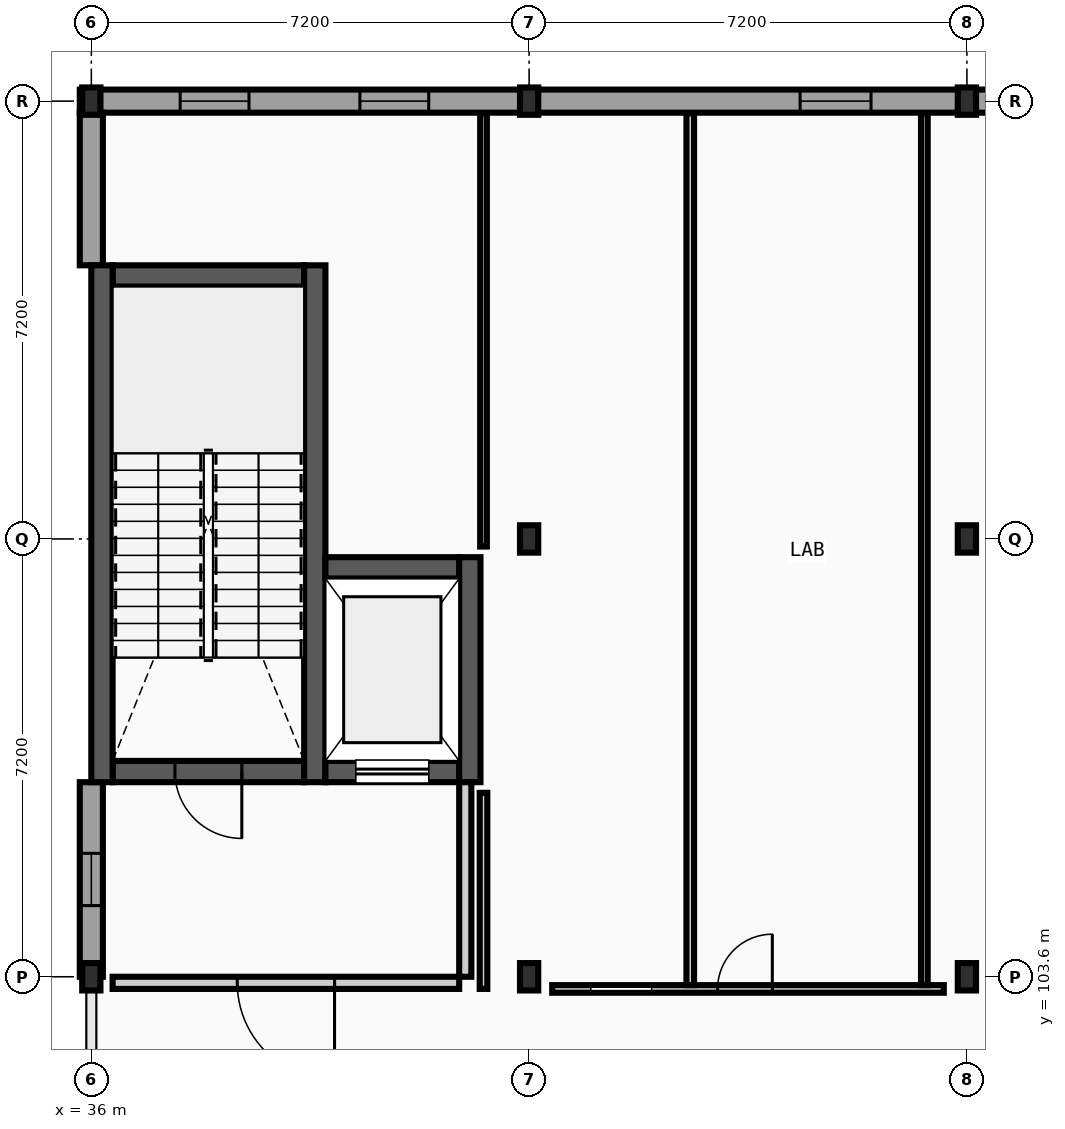
"""IFC4 building model, lengths in metres.
Left out: names, types, materials, properties, quantities, classifications, styles, units other than length and angle.
Written with IfcOpenShell. Run it as: python <this file> out.ifc"""

import sys

from ifc_helpers import new_model, si_unit, direction, frame, frame_2d, origin, origin_2d, place, context, subcontext, project, spatial, rectangle, i_section, extrude, element, fill, save


model = new_model("IFC4")
c1 = context("Model", 3, precision=1e-05, world=origin(), true_north=direction((0.0, 1.0)))
c2 = subcontext(c1, "Body", "Model", "MODEL_VIEW")
j1 = project(units=[si_unit("LENGTHUNIT", "METRE"), si_unit("PLANEANGLEUNIT", "RADIAN")], contexts=[c1])
p1 = place(None, origin())
s1 = spatial("IfcSite", under=j1, at=p1, CompositionType="ELEMENT")
p2 = place(p1, origin())
s2 = spatial("IfcBuilding", under=s1, at=p2, CompositionType="ELEMENT")
p3 = place(p2, frame((0.0, 0.0, 5.2)))
s3 = spatial("IfcBuildingStorey", under=s2, at=p3, CompositionType="ELEMENT", Elevation=5.2)
for number, where, z_axis, x_axis in (
    (1, (36.0, 103.6, 0.0), (0.0, 0.0, 1.0), (1.0, 0.0, 0.0)),
    (2, (36.0, 118.0, 0.0), (0.0, 0.0, 1.0), (1.0, 0.0, 0.0)),
    (3, (43.2, 103.6, 0.0), (0.0, 0.0, 1.0), (1.0, 0.0, 0.0)),
    (4, (43.2, 110.8, 0.0), (0.0, 0.0, 1.0), (1.0, 0.0, 0.0)),
    (5, (43.2, 118.0, 0.0), (0.0, 0.0, 1.0), (1.0, 0.0, 0.0)),
    (6, (50.4, 103.6, 0.0), (0.0, 0.0, 1.0), (1.0, 0.0, 0.0)),
    (7, (50.4, 110.8, 0.0), (0.0, 0.0, 1.0), (1.0, 0.0, 0.0)),
    (8, (50.4, 118.0, 0.0), (0.0, 0.0, 1.0), (1.0, 0.0, 0.0)),
):
    element("IfcColumn", number, at=place(p3, frame(where, z_axis=z_axis, x_axis=x_axis)), inside=s3, PredefinedType="COLUMN", context=c2, shape_type="SweptSolid", body=[
        extrude(i_section(OverallWidth=0.3, OverallDepth=0.45, WebThickness=0.014, FlangeThickness=0.026, FilletRadius=0.027, at=origin_2d()), origin(), (0.0, 0.0, 1.0), 4.4),
    ])
p4 = place(p3, frame((43.2, 118.0, 0.0), z_axis=(0.0, 0.0, 1.0), x_axis=(-1.0, 0.0, 0.0)))
e9 = element("IfcWall", 9, at=p4, inside=s3, PredefinedType="STANDARD", context=c2, shape_type="SweptSolid", body=[
    extrude(rectangle(XDim=7.39, YDim=0.38, at=frame_2d((3.695, 0.0))), origin(), (0.0, 0.0, 1.0), 3.88),
])
p5 = place(p4, frame((1.651, 0.0, 0.95)))
e10 = element("IfcOpeningElement", 10, at=p5, cuts=e9, PredefinedType="OPENING", context=c2, shape_type="SweptSolid", body=[
    extrude(rectangle(XDim=1.132, YDim=1.368, at=frame_2d((0.566, 0.684))), frame((0.0, 0.2, 0.0), z_axis=(0.0, -1.0, 0.0), x_axis=(1.0, 0.0, 0.0)), (0.0, 0.0, 1.0), 0.4),
])
p6 = place(p4, frame((4.607, 0.0, 0.95)))
e11 = element("IfcOpeningElement", 11, at=p6, cuts=e9, PredefinedType="OPENING", context=c2, shape_type="SweptSolid", body=[
    extrude(rectangle(XDim=1.132, YDim=1.368, at=frame_2d((0.566, 0.684))), frame((0.0, 0.2, 0.0), z_axis=(0.0, -1.0, 0.0), x_axis=(1.0, 0.0, 0.0)), (0.0, 0.0, 1.0), 0.4),
])
p7 = place(p3, frame((50.4, 118.0, 0.0), z_axis=(0.0, 0.0, 1.0), x_axis=(-1.0, 0.0, 0.0)))
e12 = element("IfcWall", 12, at=p7, inside=s3, PredefinedType="STANDARD", context=c2, shape_type="SweptSolid", body=[
    extrude(rectangle(XDim=7.2, YDim=0.38, at=frame_2d((3.6, 0.0))), origin(), (0.0, 0.0, 1.0), 3.88),
])
p8 = place(p7, frame((1.577, 0.0, 0.95)))
e13 = element("IfcOpeningElement", 13, at=p8, cuts=e12, PredefinedType="OPENING", context=c2, shape_type="SweptSolid", body=[
    extrude(rectangle(XDim=1.166, YDim=1.368, at=frame_2d((0.583, 0.684))), frame((0.0, 0.2, 0.0), z_axis=(0.0, -1.0, 0.0), x_axis=(1.0, 0.0, 0.0)), (0.0, 0.0, 1.0), 0.4),
])
p9 = place(p3, frame((57.6, 118.0, 0.0), z_axis=(0.0, 0.0, 1.0), x_axis=(-1.0, 0.0, 0.0)))
e14 = element("IfcWall", 14, at=p9, inside=s3, PredefinedType="STANDARD", context=c2, shape_type="SweptSolid", body=[
    extrude(rectangle(XDim=7.2, YDim=0.38, at=frame_2d((3.6, 0.0))), origin(), (0.0, 0.0, 1.0), 3.88),
])
p10 = place(p9, frame((1.56, 0.0, 0.95)))
e15 = element("IfcOpeningElement", 15, at=p10, cuts=e14, PredefinedType="OPENING", context=c2, shape_type="SweptSolid", body=[
    extrude(rectangle(XDim=1.2, YDim=1.368, at=frame_2d((0.6, 0.684))), frame((0.0, 0.2, 0.0), z_axis=(0.0, -1.0, 0.0), x_axis=(1.0, 0.0, 0.0)), (0.0, 0.0, 1.0), 0.4),
])
p11 = place(p9, frame((4.44, 0.0, 0.95)))
e16 = element("IfcOpeningElement", 16, at=p11, cuts=e14, PredefinedType="OPENING", context=c2, shape_type="SweptSolid", body=[
    extrude(rectangle(XDim=1.2, YDim=1.368, at=frame_2d((0.6, 0.684))), frame((0.0, 0.2, 0.0), z_axis=(0.0, -1.0, 0.0), x_axis=(1.0, 0.0, 0.0)), (0.0, 0.0, 1.0), 0.4),
])
p12 = place(p3, frame((36.0, 106.8, 0.0), z_axis=(0.0, 0.0, 1.0), x_axis=(0.0, -1.0, 0.0)))
e17 = element("IfcWall", 17, at=p12, inside=s3, PredefinedType="STANDARD", context=c2, shape_type="SweptSolid", body=[
    extrude(rectangle(XDim=3.2, YDim=0.38, at=frame_2d((1.6, 0.0))), origin(), (0.0, 0.0, 1.0), 4.185),
])
p13 = place(p12, frame((1.17, 0.0, 0.95)))
e18 = element("IfcOpeningElement", 18, at=p13, cuts=e17, PredefinedType="OPENING", context=c2, shape_type="SweptSolid", body=[
    extrude(rectangle(XDim=0.86, YDim=1.404, at=frame_2d((0.43, 0.702))), frame((0.0, 0.2, 0.0), z_axis=(0.0, -1.0, 0.0), x_axis=(1.0, 0.0, 0.0)), (0.0, 0.0, 1.0), 0.4),
])
p14 = place(p3, frame((36.0, 117.81, 0.0), z_axis=(0.0, 0.0, 1.0), x_axis=(0.0, -1.0, 0.0)))
e19 = element("IfcWall", 19, at=p14, inside=s3, PredefinedType="STANDARD", context=c2, shape_type="SweptSolid", body=[
    extrude(rectangle(XDim=2.51, YDim=0.38, at=frame_2d((1.255, 0.0))), origin(), (0.0, 0.0, 1.0), 4.185),
])
p15 = place(p3, frame((36.35, 106.975, 0.0), z_axis=(0.0, 0.0, 1.0), x_axis=(1.0, 0.0, 0.0)))
e20 = element("IfcWall", 20, at=p15, inside=s3, PredefinedType="SHEAR", context=c2, shape_type="SweptSolid", body=[
    extrude(rectangle(XDim=3.15, YDim=0.35, at=frame_2d((1.575, 0.0))), origin(), (0.0, 0.0, 1.0), 4.185),
])
p16 = place(p15, frame((1.025, 0.0, 0.0)))
e21 = element("IfcOpeningElement", 21, at=p16, cuts=e20, PredefinedType="OPENING", context=c2, shape_type="SweptSolid", body=[
    extrude(rectangle(XDim=1.1, YDim=2.15, at=frame_2d((0.55, 1.075))), frame((0.0, 0.185, 0.0), z_axis=(0.0, -1.0, 0.0), x_axis=(1.0, 0.0, 0.0)), (0.0, 0.0, 1.0), 0.37),
])
p17 = place(p3, frame((36.35, 115.125, 0.0), z_axis=(0.0, 0.0, 1.0), x_axis=(1.0, 0.0, 0.0)))
e22 = element("IfcWall", 22, at=p17, inside=s3, PredefinedType="SHEAR", context=c2, shape_type="SweptSolid", body=[
    extrude(rectangle(XDim=3.15, YDim=0.35, at=frame_2d((1.575, 0.0))), origin(), (0.0, 0.0, 1.0), 4.185),
])
for number, where, z_axis, x_axis in (
    (23, (36.175, 106.8, 0.0), (0.0, 0.0, 1.0), (0.0, 1.0, 0.0)),
    (24, (39.675, 106.8, 0.0), (0.0, 0.0, 1.0), (0.0, 1.0, 0.0)),
):
    element("IfcWall", number, at=place(p3, frame(where, z_axis=z_axis, x_axis=x_axis)), inside=s3, PredefinedType="SHEAR", context=c2, shape_type="SweptSolid", body=[
        extrude(rectangle(XDim=8.5, YDim=0.35, at=frame_2d((4.25, 0.0))), origin(), (0.0, 0.0, 1.0), 4.185),
    ])
p18 = place(p3, frame((39.85, 106.975, 0.0), z_axis=(0.0, 0.0, 1.0), x_axis=(1.0, 0.0, 0.0)))
e25 = element("IfcWall", 25, at=p18, inside=s3, PredefinedType="SHEAR", context=c2, shape_type="SweptSolid", body=[
    extrude(rectangle(XDim=2.2, YDim=0.35, at=frame_2d((1.1, 0.0))), origin(), (0.0, 0.0, 1.0), 4.185),
])
p19 = place(p18, frame((0.5, 0.0, 0.0)))
e26 = element("IfcOpeningElement", 26, at=p19, cuts=e25, PredefinedType="OPENING", context=c2, shape_type="SweptSolid", body=[
    extrude(rectangle(XDim=1.2, YDim=2.2, at=frame_2d((0.6, 1.1))), frame((0.0, 0.185, 0.0), z_axis=(0.0, -1.0, 0.0), x_axis=(1.0, 0.0, 0.0)), (0.0, 0.0, 1.0), 0.37),
])
p20 = place(p3, frame((39.85, 110.325, 0.0), z_axis=(0.0, 0.0, 1.0), x_axis=(1.0, 0.0, 0.0)))
e27 = element("IfcWall", 27, at=p20, inside=s3, PredefinedType="SHEAR", context=c2, shape_type="SweptSolid", body=[
    extrude(rectangle(XDim=2.2, YDim=0.35, at=frame_2d((1.1, 0.0))), origin(), (0.0, 0.0, 1.0), 4.185),
])
p21 = place(p3, frame((42.225, 106.8, 0.0), z_axis=(0.0, 0.0, 1.0), x_axis=(0.0, 1.0, 0.0)))
e28 = element("IfcWall", 28, at=p21, inside=s3, PredefinedType="SHEAR", context=c2, shape_type="SweptSolid", body=[
    extrude(rectangle(XDim=3.7, YDim=0.35, at=frame_2d((1.85, 0.0))), origin(), (0.0, 0.0, 1.0), 4.185),
])
p22 = place(p3, frame((36.35, 103.5, 0.0), z_axis=(0.0, 0.0, 1.0), x_axis=(1.0, 0.0, 0.0)))
e29 = element("IfcWall", 29, at=p22, inside=s3, PredefinedType="PARTITIONING", context=c2, shape_type="SweptSolid", body=[
    extrude(rectangle(XDim=5.7, YDim=0.2, at=frame_2d((2.85, 0.0))), origin(), (0.0, 0.0, 1.0), 3.88),
])
p23 = place(p22, frame((2.05, 0.0, 0.0)))
e30 = element("IfcOpeningElement", 30, at=p23, cuts=e29, PredefinedType="OPENING", context=c2, shape_type="SweptSolid", body=[
    extrude(rectangle(XDim=1.6, YDim=2.2, at=frame_2d((0.8, 1.1))), frame((0.0, 0.11, 0.0), z_axis=(0.0, -1.0, 0.0), x_axis=(1.0, 0.0, 0.0)), (0.0, 0.0, 1.0), 0.22),
])
p24 = place(p3, frame((42.15, 103.6, 0.0), z_axis=(0.0, 0.0, 1.0), x_axis=(0.0, 1.0, 0.0)))
e31 = element("IfcWall", 31, at=p24, inside=s3, PredefinedType="PARTITIONING", context=c2, shape_type="SweptSolid", body=[
    extrude(rectangle(XDim=3.2, YDim=0.2, at=frame_2d((1.6, 0.0))), origin(), (0.0, 0.0, 1.0), 4.185),
])
p25 = place(p3, frame((43.58, 103.4, 0.0), z_axis=(0.0, 0.0, 1.0), x_axis=(1.0, 0.0, 0.0)))
e32 = element("IfcWall", 32, at=p25, inside=s3, PredefinedType="PARTITIONING", context=c2, shape_type="SweptSolid", body=[
    extrude(rectangle(XDim=6.44, YDim=0.125, at=frame_2d((3.22, 0.0))), origin(), (0.0, 0.0, 1.0), 3.88),
])
p26 = place(p25, frame((0.635, 0.0, 0.0)))
e33 = element("IfcOpeningElement", 33, at=p26, cuts=e32, PredefinedType="OPENING", context=c2, shape_type="SweptSolid", body=[
    extrude(rectangle(XDim=1.0, YDim=2.1, at=frame_2d((0.5, 1.05))), frame((0.0, 0.073, 0.0), z_axis=(0.0, -1.0, 0.0), x_axis=(1.0, 0.0, 0.0)), (0.0, 0.0, 1.0), 0.145),
])
p27 = place(p25, frame((2.72, 0.0, 0.0)))
e34 = element("IfcOpeningElement", 34, at=p27, cuts=e32, PredefinedType="OPENING", context=c2, shape_type="SweptSolid", body=[
    extrude(rectangle(XDim=0.9, YDim=2.1, at=frame_2d((0.45, 1.05))), frame((0.0, 0.073, 0.0), z_axis=(0.0, -1.0, 0.0), x_axis=(1.0, 0.0, 0.0)), (0.0, 0.0, 1.0), 0.145),
])
p28 = place(p3, frame((42.45, 103.4, 0.0), z_axis=(0.0, 0.0, 1.0), x_axis=(0.0, 1.0, 0.0)))
e35 = element("IfcWall", 35, at=p28, inside=s3, PredefinedType="PARTITIONING", context=c2, shape_type="SweptSolid", body=[
    extrude(rectangle(XDim=3.225, YDim=0.125, at=frame_2d((1.613, 0.0))), origin(), (0.0, 0.0, 1.0), 4.185),
])
p29 = place(p3, frame((42.45, 110.675, 0.0), z_axis=(0.0, 0.0, 1.0), x_axis=(0.0, 1.0, 0.0)))
e36 = element("IfcWall", 36, at=p29, inside=s3, PredefinedType="PARTITIONING", context=c2, shape_type="SweptSolid", body=[
    extrude(rectangle(XDim=7.125, YDim=0.11, at=frame_2d((3.562, 0.0))), origin(), (0.0, 0.0, 1.0), 4.185),
])
p30 = place(p3, frame((45.85, 103.462, 0.0), z_axis=(0.0, 0.0, 1.0), x_axis=(0.0, 1.0, 0.0)))
e37 = element("IfcWall", 37, at=p30, inside=s3, PredefinedType="PARTITIONING", context=c2, shape_type="SweptSolid", body=[
    extrude(rectangle(XDim=14.338, YDim=0.125, at=frame_2d((7.169, 0.0))), origin(), (0.0, 0.0, 1.0), 4.185),
])
p31 = place(p3, frame((49.7, 103.462, 0.0), z_axis=(0.0, 0.0, 1.0), x_axis=(0.0, 1.0, 0.0)))
e38 = element("IfcWall", 38, at=p31, inside=s3, PredefinedType="PARTITIONING", context=c2, shape_type="SweptSolid", body=[
    extrude(rectangle(XDim=14.338, YDim=0.11, at=frame_2d((7.169, 0.0))), origin(), (0.0, 0.0, 1.0), 4.185),
])
p32 = place(p5, origin())
e39 = element("IfcWindow", 39, at=p32, inside=s3, PartitioningType="SINGLE_PANEL", PredefinedType="WINDOW", context=c2, shape_type="SweptSolid", body=[
    extrude(rectangle(XDim=1.132, YDim=1.368, at=frame_2d((0.566, 0.684))), frame((0.0, 0.03, 0.0), z_axis=(0.0, -1.0, 0.0), x_axis=(1.0, 0.0, 0.0)), (0.0, 0.0, 1.0), 0.06),
])
fill(e10, e39)
p33 = place(p6, origin())
e40 = element("IfcWindow", 40, at=p33, inside=s3, PartitioningType="SINGLE_PANEL", PredefinedType="WINDOW", context=c2, shape_type="SweptSolid", body=[
    extrude(rectangle(XDim=1.132, YDim=1.368, at=frame_2d((0.566, 0.684))), frame((0.0, 0.03, 0.0), z_axis=(0.0, -1.0, 0.0), x_axis=(1.0, 0.0, 0.0)), (0.0, 0.0, 1.0), 0.06),
])
fill(e11, e40)
p34 = place(p8, origin())
e41 = element("IfcWindow", 41, at=p34, inside=s3, PartitioningType="SINGLE_PANEL", PredefinedType="WINDOW", context=c2, shape_type="SweptSolid", body=[
    extrude(rectangle(XDim=1.166, YDim=1.368, at=frame_2d((0.583, 0.684))), frame((0.0, 0.03, 0.0), z_axis=(0.0, -1.0, 0.0), x_axis=(1.0, 0.0, 0.0)), (0.0, 0.0, 1.0), 0.06),
])
fill(e13, e41)
p35 = place(p13, origin())
e42 = element("IfcWindow", 42, at=p35, inside=s3, PartitioningType="SINGLE_PANEL", PredefinedType="WINDOW", context=c2, shape_type="SweptSolid", body=[
    extrude(rectangle(XDim=0.86, YDim=1.404, at=frame_2d((0.43, 0.702))), frame((0.0, 0.03, 0.0), z_axis=(0.0, -1.0, 0.0), x_axis=(1.0, 0.0, 0.0)), (0.0, 0.0, 1.0), 0.06),
])
fill(e18, e42)
p36 = place(p16, origin())
e43 = element("IfcDoor", 43, at=p36, inside=s3, OperationType="SINGLE_SWING_RIGHT", PredefinedType="DOOR", context=c2, shape_type="SweptSolid", body=[
    extrude(rectangle(XDim=1.1, YDim=2.15, at=frame_2d((0.55, 1.075))), frame((0.0, 0.025, 0.0), z_axis=(0.0, -1.0, 0.0), x_axis=(1.0, 0.0, 0.0)), (0.0, 0.0, 1.0), 0.05),
])
fill(e21, e43)
p37 = place(p19, origin())
e44 = element("IfcDoor", 44, at=p37, inside=s3, OperationType="SLIDING_TO_RIGHT", PredefinedType="DOOR", context=c2, shape_type="SweptSolid", body=[
    extrude(rectangle(XDim=1.2, YDim=2.2, at=frame_2d((0.6, 1.1))), frame((0.0, 0.025, 0.0), z_axis=(0.0, -1.0, 0.0), x_axis=(1.0, 0.0, 0.0)), (0.0, 0.0, 1.0), 0.05),
])
fill(e26, e44)
p38 = place(p23, origin())
e45 = element("IfcDoor", 45, at=p38, inside=s3, OperationType="DOUBLE_DOOR_SINGLE_SWING", PredefinedType="DOOR", context=c2, shape_type="SweptSolid", body=[
    extrude(rectangle(XDim=1.6, YDim=2.2, at=frame_2d((0.8, 1.1))), frame((0.0, 0.025, 0.0), z_axis=(0.0, -1.0, 0.0), x_axis=(1.0, 0.0, 0.0)), (0.0, 0.0, 1.0), 0.05),
])
fill(e30, e45)
p39 = place(p26, frame((1.0, 0.0, 0.0), z_axis=(0.0, 0.0, 1.0), x_axis=(-1.0, 0.0, 0.0)))
e46 = element("IfcDoor", 46, at=p39, inside=s3, OperationType="SLIDING_TO_LEFT", PredefinedType="DOOR", context=c2, shape_type="SweptSolid", body=[
    extrude(rectangle(XDim=1.0, YDim=2.1, at=frame_2d((0.5, 1.05))), frame((0.0, 0.025, 0.0), z_axis=(0.0, -1.0, 0.0), x_axis=(1.0, 0.0, 0.0)), (0.0, 0.0, 1.0), 0.05),
])
fill(e33, e46)
p40 = place(p27, frame((0.9, 0.0, 0.0), z_axis=(0.0, 0.0, 1.0), x_axis=(-1.0, 0.0, 0.0)))
e47 = element("IfcDoor", 47, at=p40, inside=s3, OperationType="SINGLE_SWING_RIGHT", PredefinedType="DOOR", context=c2, shape_type="SweptSolid", body=[
    extrude(rectangle(XDim=0.9, YDim=2.1, at=frame_2d((0.45, 1.05))), frame((0.0, 0.025, 0.0), z_axis=(0.0, -1.0, 0.0), x_axis=(1.0, 0.0, 0.0)), (0.0, 0.0, 1.0), 0.05),
])
fill(e34, e47)
save(model, sys.argv[1])
